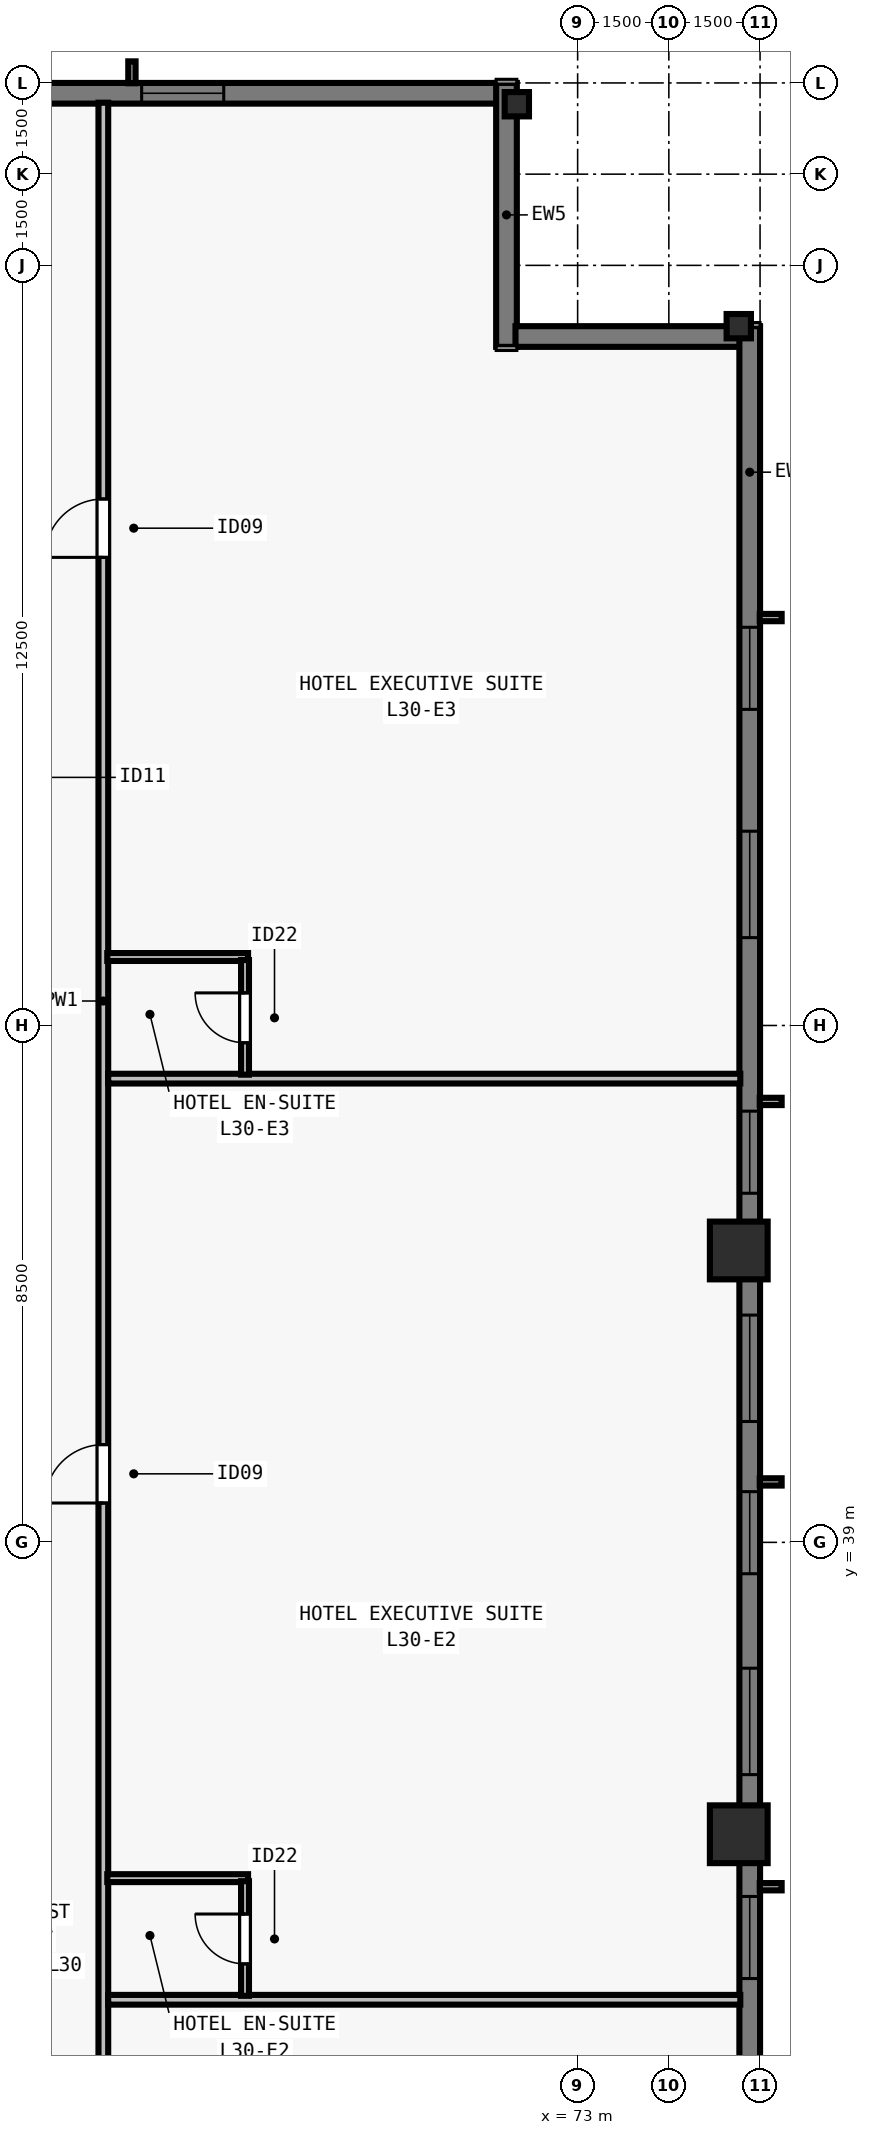
"""IFC4 building model, lengths in metres.
Left out: names, types, materials, properties, quantities, classifications, styles, units other than length and angle.
Written with IfcOpenShell. Run it as: python <this file> out.ifc"""

import sys

from ifc_helpers import new_model, si_unit, direction, frame, frame_2d, origin, origin_2d, place, context, subcontext, project, spatial, rectangle, i_section, extrude, element, fill, save


model = new_model("IFC4")
c1 = context("Model", 3, precision=1e-05, world=origin(), true_north=direction((0.0, 1.0)))
c2 = subcontext(c1, "Body", "Model", "MODEL_VIEW")
j1 = project(units=[si_unit("LENGTHUNIT", "METRE"), si_unit("PLANEANGLEUNIT", "RADIAN")], contexts=[c1])
p1 = place(None, origin())
s1 = spatial("IfcSite", under=j1, at=p1, CompositionType="ELEMENT")
p2 = place(p1, origin())
s2 = spatial("IfcBuilding", under=s1, at=p2, CompositionType="ELEMENT")
p3 = place(p2, frame((0.0, 0.0, 113.0)))
s3 = spatial("IfcBuildingStorey", under=s2, at=p3, CompositionType="ELEMENT", Elevation=113.0)
for number, where, z_axis, x_axis in (
    (1, (75.65, 34.2, 0.0), (0.0, 0.0, 1.0), (0.0, 1.0, 0.0)),
    (2, (75.65, 43.8, 0.0), (0.0, 0.0, 1.0), (0.0, 1.0, 0.0)),
):
    element("IfcColumn", number, at=place(p3, frame(where, z_axis=z_axis, x_axis=x_axis)), inside=s3, PredefinedType="COLUMN", context=c2, shape_type="SweptSolid", body=[
        extrude(rectangle(XDim=0.95, YDim=0.95, at=origin_2d()), origin(), (0.0, 0.0, 1.0), 3.5),
    ])
for number, where, z_axis, x_axis in (
    (3, (75.65, 59.0, 0.0), (0.0, 0.0, 1.0), (0.0, 1.0, 0.0)),
    (4, (72.0, 62.65, 0.0), (0.0, 0.0, 1.0), (1.0, 0.0, 0.0)),
):
    element("IfcColumn", number, at=place(p3, frame(where, z_axis=z_axis, x_axis=x_axis)), inside=s3, PredefinedType="COLUMN", context=c2, shape_type="SweptSolid", body=[
        extrude(i_section(OverallWidth=0.4, OverallDepth=0.4, WebThickness=0.022, FlangeThickness=0.036, at=origin_2d()), origin(), (0.0, 0.0, 1.0), 3.5),
    ])
p4 = place(p3, frame((32.0, 62.83, 0.0), z_axis=(0.0, 0.0, 1.0), x_axis=(1.0, 0.0, 0.0)))
e5 = element("IfcWall", 5, at=p4, inside=s3, PredefinedType="SOLIDWALL", context=c2, shape_type="SweptSolid", body=[
    extrude(rectangle(XDim=39.682, YDim=0.34, at=frame_2d((19.841, 0.0))), origin(), (0.0, 0.0, 1.0), 3.28),
])
p5 = place(p4, frame((4.952, 0.0, 0.8)))
e6 = element("IfcOpeningElement", 6, at=p5, cuts=e5, PredefinedType="OPENING", context=c2, shape_type="SweptSolid", body=[
    extrude(rectangle(XDim=1.35, YDim=1.66, at=frame_2d((0.675, 0.83))), frame((0.0, 0.18, 0.0), z_axis=(0.0, -1.0, 0.0), x_axis=(1.0, 0.0, 0.0)), (0.0, 0.0, 1.0), 0.36),
])
p6 = place(p4, frame((9.555, 0.0, 0.8)))
e7 = element("IfcOpeningElement", 7, at=p6, cuts=e5, PredefinedType="OPENING", context=c2, shape_type="SweptSolid", body=[
    extrude(rectangle(XDim=1.75, YDim=1.66, at=frame_2d((0.875, 0.83))), frame((0.0, 0.18, 0.0), z_axis=(0.0, -1.0, 0.0), x_axis=(1.0, 0.0, 0.0)), (0.0, 0.0, 1.0), 0.36),
])
p7 = place(p4, frame((12.059, 0.0, 0.8)))
e8 = element("IfcOpeningElement", 8, at=p7, cuts=e5, PredefinedType="OPENING", context=c2, shape_type="SweptSolid", body=[
    extrude(rectangle(XDim=1.35, YDim=1.66, at=frame_2d((0.675, 0.83))), frame((0.0, 0.18, 0.0), z_axis=(0.0, -1.0, 0.0), x_axis=(1.0, 0.0, 0.0)), (0.0, 0.0, 1.0), 0.36),
])
p8 = place(p4, frame((19.166, 0.0, 0.8)))
e9 = element("IfcOpeningElement", 9, at=p8, cuts=e5, PredefinedType="OPENING", context=c2, shape_type="SweptSolid", body=[
    extrude(rectangle(XDim=1.35, YDim=1.66, at=frame_2d((0.675, 0.83))), frame((0.0, 0.18, 0.0), z_axis=(0.0, -1.0, 0.0), x_axis=(1.0, 0.0, 0.0)), (0.0, 0.0, 1.0), 0.36),
])
p9 = place(p4, frame((21.27, 0.0, 0.8)))
e10 = element("IfcOpeningElement", 10, at=p9, cuts=e5, PredefinedType="OPENING", context=c2, shape_type="SweptSolid", body=[
    extrude(rectangle(XDim=1.75, YDim=1.66, at=frame_2d((0.875, 0.83))), frame((0.0, 0.18, 0.0), z_axis=(0.0, -1.0, 0.0), x_axis=(1.0, 0.0, 0.0)), (0.0, 0.0, 1.0), 0.36),
])
p10 = place(p4, frame((26.273, 0.0, 0.8)))
e11 = element("IfcOpeningElement", 11, at=p10, cuts=e5, PredefinedType="OPENING", context=c2, shape_type="SweptSolid", body=[
    extrude(rectangle(XDim=1.35, YDim=1.66, at=frame_2d((0.675, 0.83))), frame((0.0, 0.18, 0.0), z_axis=(0.0, -1.0, 0.0), x_axis=(1.0, 0.0, 0.0)), (0.0, 0.0, 1.0), 0.36),
])
p11 = place(p4, frame((28.777, 0.0, 0.8)))
e12 = element("IfcOpeningElement", 12, at=p11, cuts=e5, PredefinedType="OPENING", context=c2, shape_type="SweptSolid", body=[
    extrude(rectangle(XDim=1.75, YDim=1.66, at=frame_2d((0.875, 0.83))), frame((0.0, 0.18, 0.0), z_axis=(0.0, -1.0, 0.0), x_axis=(1.0, 0.0, 0.0)), (0.0, 0.0, 1.0), 0.36),
])
p12 = place(p4, frame((33.83, 0.0, 0.8)))
e13 = element("IfcOpeningElement", 13, at=p12, cuts=e5, PredefinedType="OPENING", context=c2, shape_type="SweptSolid", body=[
    extrude(rectangle(XDim=1.35, YDim=1.66, at=frame_2d((0.675, 0.83))), frame((0.0, 0.18, 0.0), z_axis=(0.0, -1.0, 0.0), x_axis=(1.0, 0.0, 0.0)), (0.0, 0.0, 1.0), 0.36),
])
p13 = place(p3, frame((71.83, 63.0, 0.0), z_axis=(0.0, 0.0, 1.0), x_axis=(0.0, -1.0, 0.0)))
e14 = element("IfcWall", 14, at=p13, inside=s3, PredefinedType="SOLIDWALL", context=c2, shape_type="SweptSolid", body=[
    extrude(rectangle(XDim=4.34, YDim=0.34, at=frame_2d((2.17, 0.0))), origin(), (0.0, 0.0, 1.0), 3.28),
])
p14 = place(p3, frame((71.978, 58.83, 0.0), z_axis=(0.0, 0.0, 1.0), x_axis=(1.0, 0.0, 0.0)))
e15 = element("IfcWall", 15, at=p14, inside=s3, PredefinedType="SOLIDWALL", context=c2, shape_type="SweptSolid", body=[
    extrude(rectangle(XDim=3.704, YDim=0.34, at=frame_2d((1.852, 0.0))), origin(), (0.0, 0.0, 1.0), 3.28),
])
p15 = place(p3, frame((75.83, 59.0, 0.0), z_axis=(0.0, 0.0, 1.0), x_axis=(0.0, -1.0, 0.0)))
e16 = element("IfcWall", 16, at=p15, inside=s3, PredefinedType="SOLIDWALL", context=c2, shape_type="SweptSolid", body=[
    extrude(rectangle(XDim=39.682, YDim=0.34, at=frame_2d((19.841, 0.0))), origin(), (0.0, 0.0, 1.0), 3.28),
])
p16 = place(p15, frame((4.952, 0.0, 0.8)))
e17 = element("IfcOpeningElement", 17, at=p16, cuts=e16, PredefinedType="OPENING", context=c2, shape_type="SweptSolid", body=[
    extrude(rectangle(XDim=1.35, YDim=1.66, at=frame_2d((0.675, 0.83))), frame((0.0, 0.18, 0.0), z_axis=(0.0, -1.0, 0.0), x_axis=(1.0, 0.0, 0.0)), (0.0, 0.0, 1.0), 0.36),
])
p17 = place(p15, frame((8.305, 0.0, 0.8)))
e18 = element("IfcOpeningElement", 18, at=p17, cuts=e16, PredefinedType="OPENING", context=c2, shape_type="SweptSolid", body=[
    extrude(rectangle(XDim=1.75, YDim=1.66, at=frame_2d((0.875, 0.83))), frame((0.0, 0.18, 0.0), z_axis=(0.0, -1.0, 0.0), x_axis=(1.0, 0.0, 0.0)), (0.0, 0.0, 1.0), 0.36),
])
p18 = place(p15, frame((12.909, 0.0, 0.8)))
e19 = element("IfcOpeningElement", 19, at=p18, cuts=e16, PredefinedType="OPENING", context=c2, shape_type="SweptSolid", body=[
    extrude(rectangle(XDim=1.35, YDim=1.66, at=frame_2d((0.675, 0.83))), frame((0.0, 0.18, 0.0), z_axis=(0.0, -1.0, 0.0), x_axis=(1.0, 0.0, 0.0)), (0.0, 0.0, 1.0), 0.36),
])
p19 = place(p15, frame((16.262, 0.0, 0.8)))
e20 = element("IfcOpeningElement", 20, at=p19, cuts=e16, PredefinedType="OPENING", context=c2, shape_type="SweptSolid", body=[
    extrude(rectangle(XDim=1.75, YDim=1.66, at=frame_2d((0.875, 0.83))), frame((0.0, 0.18, 0.0), z_axis=(0.0, -1.0, 0.0), x_axis=(1.0, 0.0, 0.0)), (0.0, 0.0, 1.0), 0.36),
])
p20 = place(p15, frame((19.166, 0.0, 0.8)))
e21 = element("IfcOpeningElement", 21, at=p20, cuts=e16, PredefinedType="OPENING", context=c2, shape_type="SweptSolid", body=[
    extrude(rectangle(XDim=1.35, YDim=1.66, at=frame_2d((0.675, 0.83))), frame((0.0, 0.18, 0.0), z_axis=(0.0, -1.0, 0.0), x_axis=(1.0, 0.0, 0.0)), (0.0, 0.0, 1.0), 0.36),
])
p21 = place(p15, frame((22.07, 0.0, 0.8)))
e22 = element("IfcOpeningElement", 22, at=p21, cuts=e16, PredefinedType="OPENING", context=c2, shape_type="SweptSolid", body=[
    extrude(rectangle(XDim=1.75, YDim=1.66, at=frame_2d((0.875, 0.83))), frame((0.0, 0.18, 0.0), z_axis=(0.0, -1.0, 0.0), x_axis=(1.0, 0.0, 0.0)), (0.0, 0.0, 1.0), 0.36),
])
p22 = place(p15, frame((25.823, 0.0, 0.8)))
e23 = element("IfcOpeningElement", 23, at=p22, cuts=e16, PredefinedType="OPENING", context=c2, shape_type="SweptSolid", body=[
    extrude(rectangle(XDim=1.35, YDim=1.66, at=frame_2d((0.675, 0.83))), frame((0.0, 0.18, 0.0), z_axis=(0.0, -1.0, 0.0), x_axis=(1.0, 0.0, 0.0)), (0.0, 0.0, 1.0), 0.36),
])
p23 = place(p15, frame((29.627, 0.0, 0.8)))
e24 = element("IfcOpeningElement", 24, at=p23, cuts=e16, PredefinedType="OPENING", context=c2, shape_type="SweptSolid", body=[
    extrude(rectangle(XDim=1.75, YDim=1.66, at=frame_2d((0.875, 0.83))), frame((0.0, 0.18, 0.0), z_axis=(0.0, -1.0, 0.0), x_axis=(1.0, 0.0, 0.0)), (0.0, 0.0, 1.0), 0.36),
])
p24 = place(p15, frame((33.38, 0.0, 0.8)))
e25 = element("IfcOpeningElement", 25, at=p24, cuts=e16, PredefinedType="OPENING", context=c2, shape_type="SweptSolid", body=[
    extrude(rectangle(XDim=1.35, YDim=1.66, at=frame_2d((0.675, 0.83))), frame((0.0, 0.18, 0.0), z_axis=(0.0, -1.0, 0.0), x_axis=(1.0, 0.0, 0.0)), (0.0, 0.0, 1.0), 0.36),
])
p25 = place(p3, frame((65.2, 15.325, 0.0), z_axis=(0.0, 0.0, 1.0), x_axis=(0.0, 1.0, 0.0)))
e26 = element("IfcWall", 26, at=p25, inside=s3, PredefinedType="PARTITIONING", context=c2, shape_type="SweptSolid", body=[
    extrude(rectangle(XDim=47.35, YDim=0.16, at=frame_2d((23.675, 0.0))), origin(), (0.0, 0.0, 1.0), 2.555),
])
p26 = place(p25, frame((8.944, 0.0, 0.0)))
e27 = element("IfcOpeningElement", 27, at=p26, cuts=e26, PredefinedType="OPENING", context=c2, shape_type="SweptSolid", body=[
    extrude(rectangle(XDim=0.96, YDim=2.15, at=frame_2d((0.48, 1.075))), frame((0.0, 0.09, 0.0), z_axis=(0.0, -1.0, 0.0), x_axis=(1.0, 0.0, 0.0)), (0.0, 0.0, 1.0), 0.18),
])
p27 = place(p25, frame((24.322, 0.0, 0.0)))
e28 = element("IfcOpeningElement", 28, at=p27, cuts=e26, PredefinedType="OPENING", context=c2, shape_type="SweptSolid", body=[
    extrude(rectangle(XDim=0.96, YDim=2.15, at=frame_2d((0.48, 1.075))), frame((0.0, 0.09, 0.0), z_axis=(0.0, -1.0, 0.0), x_axis=(1.0, 0.0, 0.0)), (0.0, 0.0, 1.0), 0.18),
])
p28 = place(p25, frame((39.873, 0.0, 0.0)))
e29 = element("IfcOpeningElement", 29, at=p28, cuts=e26, PredefinedType="OPENING", context=c2, shape_type="SweptSolid", body=[
    extrude(rectangle(XDim=0.96, YDim=2.15, at=frame_2d((0.48, 1.075))), frame((0.0, 0.09, 0.0), z_axis=(0.0, -1.0, 0.0), x_axis=(1.0, 0.0, 0.0)), (0.0, 0.0, 1.0), 0.18),
])
p29 = place(p3, frame((65.28, 31.478, 0.0), z_axis=(0.0, 0.0, 1.0), x_axis=(1.0, 0.0, 0.0)))
e30 = element("IfcWall", 30, at=p29, inside=s3, PredefinedType="PARTITIONING", context=c2, shape_type="SweptSolid", body=[
    extrude(rectangle(XDim=10.395, YDim=0.16, at=frame_2d((5.198, 0.0))), origin(), (0.0, 0.0, 1.0), 3.28),
])
p30 = place(p3, frame((65.265, 33.478, 0.0), z_axis=(0.0, 0.0, 1.0), x_axis=(1.0, 0.0, 0.0)))
e31 = element("IfcWall", 31, at=p30, inside=s3, PredefinedType="PLUMBINGWALL", context=c2, shape_type="SweptSolid", body=[
    extrude(rectangle(XDim=2.315, YDim=0.13, at=frame_2d((1.158, 0.0))), origin(), (0.0, 0.0, 1.0), 3.28),
])
p31 = place(p3, frame((67.53, 31.543, 0.0), z_axis=(0.0, 0.0, 1.0), x_axis=(0.0, 1.0, 0.0)))
e32 = element("IfcWall", 32, at=p31, inside=s3, PredefinedType="PLUMBINGWALL", context=c2, shape_type="SweptSolid", body=[
    extrude(rectangle(XDim=1.885, YDim=0.13, at=frame_2d((0.942, 0.0))), origin(), (0.0, 0.0, 1.0), 3.28),
])
p32 = place(p31, frame((0.525, 0.0, 0.0)))
e33 = element("IfcOpeningElement", 33, at=p32, cuts=e32, PredefinedType="OPENING", context=c2, shape_type="SweptSolid", body=[
    extrude(rectangle(XDim=0.82, YDim=2.1, at=frame_2d((0.41, 1.05))), frame((0.0, 0.075, 0.0), z_axis=(0.0, -1.0, 0.0), x_axis=(1.0, 0.0, 0.0)), (0.0, 0.0, 1.0), 0.15),
])
p33 = place(p3, frame((65.28, 46.626, 0.0), z_axis=(0.0, 0.0, 1.0), x_axis=(1.0, 0.0, 0.0)))
e34 = element("IfcWall", 34, at=p33, inside=s3, PredefinedType="PARTITIONING", context=c2, shape_type="SweptSolid", body=[
    extrude(rectangle(XDim=10.395, YDim=0.16, at=frame_2d((5.198, 0.0))), origin(), (0.0, 0.0, 1.0), 3.28),
])
p34 = place(p3, frame((65.265, 48.626, 0.0), z_axis=(0.0, 0.0, 1.0), x_axis=(1.0, 0.0, 0.0)))
e35 = element("IfcWall", 35, at=p34, inside=s3, PredefinedType="PLUMBINGWALL", context=c2, shape_type="SweptSolid", body=[
    extrude(rectangle(XDim=2.315, YDim=0.13, at=frame_2d((1.158, 0.0))), origin(), (0.0, 0.0, 1.0), 3.28),
])
p35 = place(p3, frame((67.53, 46.691, 0.0), z_axis=(0.0, 0.0, 1.0), x_axis=(0.0, 1.0, 0.0)))
e36 = element("IfcWall", 36, at=p35, inside=s3, PredefinedType="PLUMBINGWALL", context=c2, shape_type="SweptSolid", body=[
    extrude(rectangle(XDim=1.885, YDim=0.13, at=frame_2d((0.942, 0.0))), origin(), (0.0, 0.0, 1.0), 3.28),
])
p36 = place(p35, frame((0.525, 0.0, 0.0)))
e37 = element("IfcOpeningElement", 37, at=p36, cuts=e36, PredefinedType="OPENING", context=c2, shape_type="SweptSolid", body=[
    extrude(rectangle(XDim=0.82, YDim=2.1, at=frame_2d((0.41, 1.05))), frame((0.0, 0.075, 0.0), z_axis=(0.0, -1.0, 0.0), x_axis=(1.0, 0.0, 0.0)), (0.0, 0.0, 1.0), 0.15),
])
p37 = place(p12, origin())
e38 = element("IfcWindow", 38, at=p37, inside=s3, PartitioningType="SINGLE_PANEL", PredefinedType="WINDOW", context=c2, shape_type="SweptSolid", body=[
    extrude(rectangle(XDim=1.35, YDim=1.66, at=frame_2d((0.675, 0.83))), frame((0.0, -0.05, 0.0), z_axis=(0.0, -1.0, 0.0), x_axis=(1.0, 0.0, 0.0)), (0.0, 0.0, 1.0), 0.06),
])
fill(e13, e38)
p38 = place(p16, origin())
e39 = element("IfcWindow", 39, at=p38, inside=s3, PartitioningType="SINGLE_PANEL", PredefinedType="WINDOW", context=c2, shape_type="SweptSolid", body=[
    extrude(rectangle(XDim=1.35, YDim=1.66, at=frame_2d((0.675, 0.83))), frame((0.0, -0.05, 0.0), z_axis=(0.0, -1.0, 0.0), x_axis=(1.0, 0.0, 0.0)), (0.0, 0.0, 1.0), 0.06),
])
fill(e17, e39)
p39 = place(p17, origin())
e40 = element("IfcWindow", 40, at=p39, inside=s3, PartitioningType="SINGLE_PANEL", PredefinedType="WINDOW", context=c2, shape_type="SweptSolid", body=[
    extrude(rectangle(XDim=1.75, YDim=1.66, at=frame_2d((0.875, 0.83))), frame((0.0, -0.05, 0.0), z_axis=(0.0, -1.0, 0.0), x_axis=(1.0, 0.0, 0.0)), (0.0, 0.0, 1.0), 0.06),
])
fill(e18, e40)
p40 = place(p18, origin())
e41 = element("IfcWindow", 41, at=p40, inside=s3, PartitioningType="SINGLE_PANEL", PredefinedType="WINDOW", context=c2, shape_type="SweptSolid", body=[
    extrude(rectangle(XDim=1.35, YDim=1.66, at=frame_2d((0.675, 0.83))), frame((0.0, -0.05, 0.0), z_axis=(0.0, -1.0, 0.0), x_axis=(1.0, 0.0, 0.0)), (0.0, 0.0, 1.0), 0.06),
])
fill(e19, e41)
p41 = place(p19, origin())
e42 = element("IfcWindow", 42, at=p41, inside=s3, PartitioningType="SINGLE_PANEL", PredefinedType="WINDOW", context=c2, shape_type="SweptSolid", body=[
    extrude(rectangle(XDim=1.75, YDim=1.66, at=frame_2d((0.875, 0.83))), frame((0.0, -0.05, 0.0), z_axis=(0.0, -1.0, 0.0), x_axis=(1.0, 0.0, 0.0)), (0.0, 0.0, 1.0), 0.06),
])
fill(e20, e42)
p42 = place(p20, origin())
e43 = element("IfcWindow", 43, at=p42, inside=s3, PartitioningType="SINGLE_PANEL", PredefinedType="WINDOW", context=c2, shape_type="SweptSolid", body=[
    extrude(rectangle(XDim=1.35, YDim=1.66, at=frame_2d((0.675, 0.83))), frame((0.0, -0.05, 0.0), z_axis=(0.0, -1.0, 0.0), x_axis=(1.0, 0.0, 0.0)), (0.0, 0.0, 1.0), 0.06),
])
fill(e21, e43)
p43 = place(p21, origin())
e44 = element("IfcWindow", 44, at=p43, inside=s3, PartitioningType="SINGLE_PANEL", PredefinedType="WINDOW", context=c2, shape_type="SweptSolid", body=[
    extrude(rectangle(XDim=1.75, YDim=1.66, at=frame_2d((0.875, 0.83))), frame((0.0, -0.05, 0.0), z_axis=(0.0, -1.0, 0.0), x_axis=(1.0, 0.0, 0.0)), (0.0, 0.0, 1.0), 0.06),
])
fill(e22, e44)
p44 = place(p22, origin())
e45 = element("IfcWindow", 45, at=p44, inside=s3, PartitioningType="SINGLE_PANEL", PredefinedType="WINDOW", context=c2, shape_type="SweptSolid", body=[
    extrude(rectangle(XDim=1.35, YDim=1.66, at=frame_2d((0.675, 0.83))), frame((0.0, -0.05, 0.0), z_axis=(0.0, -1.0, 0.0), x_axis=(1.0, 0.0, 0.0)), (0.0, 0.0, 1.0), 0.06),
])
fill(e23, e45)
p45 = place(p32, origin())
e46 = element("IfcDoor", 46, at=p45, inside=s3, OperationType="SINGLE_SWING_RIGHT", PredefinedType="DOOR", context=c2, shape_type="SweptSolid", body=[
    extrude(rectangle(XDim=0.82, YDim=2.1, at=frame_2d((0.41, 1.05))), frame((0.0, 0.025, 0.0), z_axis=(0.0, -1.0, 0.0), x_axis=(1.0, 0.0, 0.0)), (0.0, 0.0, 1.0), 0.05),
])
fill(e33, e46)
p46 = place(p27, origin())
e47 = element("IfcDoor", 47, at=p46, inside=s3, OperationType="SINGLE_SWING_LEFT", PredefinedType="DOOR", context=c2, shape_type="SweptSolid", body=[
    extrude(rectangle(XDim=0.96, YDim=2.15, at=frame_2d((0.48, 1.075))), frame((0.0, 0.025, 0.0), z_axis=(0.0, -1.0, 0.0), x_axis=(1.0, 0.0, 0.0)), (0.0, 0.0, 1.0), 0.05),
])
fill(e28, e47)
p47 = place(p36, origin())
e48 = element("IfcDoor", 48, at=p47, inside=s3, OperationType="SINGLE_SWING_RIGHT", PredefinedType="DOOR", context=c2, shape_type="SweptSolid", body=[
    extrude(rectangle(XDim=0.82, YDim=2.1, at=frame_2d((0.41, 1.05))), frame((0.0, 0.025, 0.0), z_axis=(0.0, -1.0, 0.0), x_axis=(1.0, 0.0, 0.0)), (0.0, 0.0, 1.0), 0.05),
])
fill(e37, e48)
p48 = place(p28, origin())
e49 = element("IfcDoor", 49, at=p48, inside=s3, OperationType="SINGLE_SWING_LEFT", PredefinedType="DOOR", context=c2, shape_type="SweptSolid", body=[
    extrude(rectangle(XDim=0.96, YDim=2.15, at=frame_2d((0.48, 1.075))), frame((0.0, 0.025, 0.0), z_axis=(0.0, -1.0, 0.0), x_axis=(1.0, 0.0, 0.0)), (0.0, 0.0, 1.0), 0.05),
])
fill(e29, e49)
save(model, sys.argv[1])
